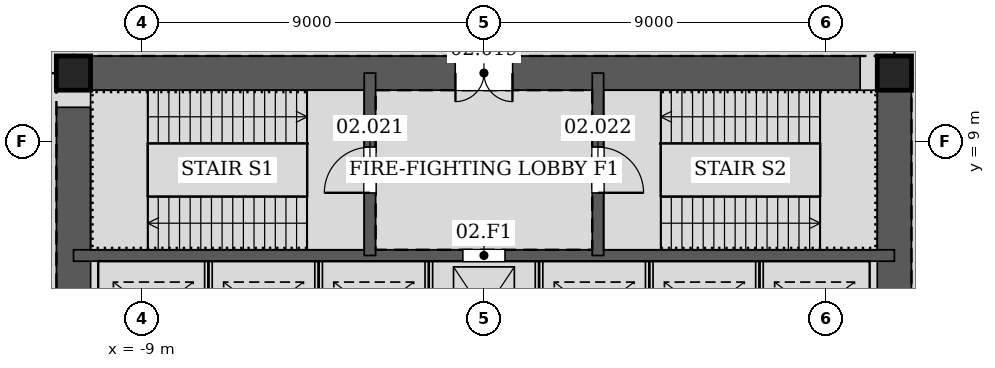
"""IFC4 building model, lengths in metres.
Left out: names, types, materials, properties, quantities, classifications, styles, units other than length and angle.
Written with IfcOpenShell. Run it as: python <this file> out.ifc"""

import sys

from ifc_helpers import new_model, si_unit, direction, frame, frame_2d, origin, origin_2d, place, context, subcontext, project, spatial, rectangle, hollow_rectangle, extrude, element, fill, save


model = new_model("IFC4")
c1 = context("Model", 3, precision=1e-05, world=origin(), true_north=direction((0.0, 1.0)))
c2 = subcontext(c1, "Body", "Model", "MODEL_VIEW")
j1 = project(units=[si_unit("LENGTHUNIT", "METRE"), si_unit("PLANEANGLEUNIT", "RADIAN")], contexts=[c1])
p1 = place(None, origin())
s1 = spatial("IfcSite", under=j1, at=p1, CompositionType="ELEMENT")
p2 = place(p1, origin())
s2 = spatial("IfcBuilding", under=s1, at=p2, CompositionType="ELEMENT")
p3 = place(p2, frame((0.0, 0.0, 13.2)))
s3 = spatial("IfcBuildingStorey", under=s2, at=p3, CompositionType="ELEMENT", Elevation=13.2)
for number, where, z_axis, x_axis in (
    (1, (10.8, 10.8, 0.0), (0.0, 0.0, 1.0), (1.0, 0.0, 0.0)),
    (2, (-10.8, 10.8, 0.0), (0.0, 0.0, 1.0), (1.0, 0.0, 0.0)),
):
    element("IfcColumn", number, at=place(p3, frame(where, z_axis=z_axis, x_axis=x_axis)), inside=s3, PredefinedType="COLUMN", context=c2, shape_type="SweptSolid", body=[
        extrude(hollow_rectangle(XDim=0.9, YDim=0.9, WallThickness=0.06, at=origin_2d()), origin(), (0.0, 0.0, 1.0), 5.4),
    ])
p4 = place(p3, frame((10.8, -10.8, 0.0), z_axis=(0.0, 0.0, 1.0), x_axis=(0.0, 1.0, 0.0)))
e3 = element("IfcWall", 3, at=p4, inside=s3, PredefinedType="SOLIDWALL", context=c2, shape_type="SweptSolid", body=[
    extrude(rectangle(XDim=21.6, YDim=0.9, at=frame_2d((10.8, 0.0))), origin(), (0.0, 0.0, 1.0), 5.4),
])
p5 = place(p4, frame((11.7, 0.0, 0.0)))
e4 = element("IfcOpeningElement", 4, at=p5, cuts=e3, PredefinedType="OPENING", context=c2, shape_type="SweptSolid", body=[
    extrude(rectangle(XDim=1.2, YDim=2.1, at=frame_2d((0.6, 1.05))), frame((0.0, 0.46, 0.0), z_axis=(0.0, -1.0, 0.0), x_axis=(1.0, 0.0, 0.0)), (0.0, 0.0, 1.0), 0.92),
])
p6 = place(p4, frame((8.7, 0.0, 0.0)))
e5 = element("IfcOpeningElement", 5, at=p6, cuts=e3, PredefinedType="OPENING", context=c2, shape_type="SweptSolid", body=[
    extrude(rectangle(XDim=1.2, YDim=2.1, at=frame_2d((0.6, 1.05))), frame((0.0, 0.46, 0.0), z_axis=(0.0, -1.0, 0.0), x_axis=(1.0, 0.0, 0.0)), (0.0, 0.0, 1.0), 0.92),
])
p7 = place(p3, frame((10.8, 10.8, 0.0), z_axis=(0.0, 0.0, 1.0), x_axis=(-1.0, 0.0, 0.0)))
e6 = element("IfcWall", 6, at=p7, inside=s3, PredefinedType="SOLIDWALL", context=c2, shape_type="SweptSolid", body=[
    extrude(rectangle(XDim=21.6, YDim=0.9, at=frame_2d((10.8, 0.0))), origin(), (0.0, 0.0, 1.0), 5.4),
])
p8 = place(p7, frame((10.05, 0.0, 0.0)))
e7 = element("IfcOpeningElement", 7, at=p8, cuts=e6, PredefinedType="OPENING", context=c2, shape_type="SweptSolid", body=[
    extrude(rectangle(XDim=1.5, YDim=2.1, at=frame_2d((0.75, 1.05))), frame((0.0, 0.46, 0.0), z_axis=(0.0, -1.0, 0.0), x_axis=(1.0, 0.0, 0.0)), (0.0, 0.0, 1.0), 0.92),
])
p9 = place(p3, frame((-10.8, 10.8, 0.0), z_axis=(0.0, 0.0, 1.0), x_axis=(0.0, -1.0, 0.0)))
e8 = element("IfcWall", 8, at=p9, inside=s3, PredefinedType="SOLIDWALL", context=c2, shape_type="SweptSolid", body=[
    extrude(rectangle(XDim=21.6, YDim=0.9, at=frame_2d((10.8, 0.0))), origin(), (0.0, 0.0, 1.0), 5.4),
])
p10 = place(p9, frame((8.7, 0.0, 0.0)))
e9 = element("IfcOpeningElement", 9, at=p10, cuts=e8, PredefinedType="OPENING", context=c2, shape_type="SweptSolid", body=[
    extrude(rectangle(XDim=1.2, YDim=2.1, at=frame_2d((0.6, 1.05))), frame((0.0, 0.46, 0.0), z_axis=(0.0, -1.0, 0.0), x_axis=(1.0, 0.0, 0.0)), (0.0, 0.0, 1.0), 0.92),
])
p11 = place(p9, frame((11.7, 0.0, 0.0)))
e10 = element("IfcOpeningElement", 10, at=p11, cuts=e8, PredefinedType="OPENING", context=c2, shape_type="SweptSolid", body=[
    extrude(rectangle(XDim=1.2, YDim=2.1, at=frame_2d((0.6, 1.05))), frame((0.0, 0.46, 0.0), z_axis=(0.0, -1.0, 0.0), x_axis=(1.0, 0.0, 0.0)), (0.0, 0.0, 1.0), 0.92),
])
p12 = place(p3, frame((-10.8, 6.0, 0.0), z_axis=(0.0, 0.0, 1.0), x_axis=(1.0, 0.0, 0.0)))
e11 = element("IfcWall", 11, at=p12, inside=s3, PredefinedType="SOLIDWALL", context=c2, shape_type="SweptSolid", body=[
    extrude(rectangle(XDim=21.6, YDim=0.3, at=frame_2d((10.8, 0.0))), origin(), (0.0, 0.0, 1.0), 5.4),
])
p13 = place(p12, frame((10.25, 0.0, 0.0)))
e12 = element("IfcOpeningElement", 12, at=p13, cuts=e11, PredefinedType="OPENING", context=c2, shape_type="SweptSolid", body=[
    extrude(rectangle(XDim=1.1, YDim=2.1, at=frame_2d((0.55, 1.05))), frame((0.0, 0.16, 0.0), z_axis=(0.0, -1.0, 0.0), x_axis=(1.0, 0.0, 0.0)), (0.0, 0.0, 1.0), 0.32),
])
p14 = place(p3, frame((-3.0, 6.0, 0.0), z_axis=(0.0, 0.0, 1.0), x_axis=(0.0, 1.0, 0.0)))
e13 = element("IfcWall", 13, at=p14, inside=s3, PredefinedType="SOLIDWALL", context=c2, shape_type="SweptSolid", body=[
    extrude(rectangle(XDim=4.8, YDim=0.3, at=frame_2d((2.4, 0.0))), origin(), (0.0, 0.0, 1.0), 5.4),
])
p15 = place(p14, frame((1.65, 0.0, 0.0)))
e14 = element("IfcOpeningElement", 14, at=p15, cuts=e13, PredefinedType="OPENING", context=c2, shape_type="SweptSolid", body=[
    extrude(rectangle(XDim=1.2, YDim=2.1, at=frame_2d((0.6, 1.05))), frame((0.0, 0.16, 0.0), z_axis=(0.0, -1.0, 0.0), x_axis=(1.0, 0.0, 0.0)), (0.0, 0.0, 1.0), 0.32),
])
p16 = place(p3, frame((3.0, 6.0, 0.0), z_axis=(0.0, 0.0, 1.0), x_axis=(0.0, 1.0, 0.0)))
e15 = element("IfcWall", 15, at=p16, inside=s3, PredefinedType="SOLIDWALL", context=c2, shape_type="SweptSolid", body=[
    extrude(rectangle(XDim=4.8, YDim=0.3, at=frame_2d((2.4, 0.0))), origin(), (0.0, 0.0, 1.0), 5.4),
])
p17 = place(p16, frame((1.65, 0.0, 0.0)))
e16 = element("IfcOpeningElement", 16, at=p17, cuts=e15, PredefinedType="OPENING", context=c2, shape_type="SweptSolid", body=[
    extrude(rectangle(XDim=1.2, YDim=2.1, at=frame_2d((0.6, 1.05))), frame((0.0, 0.16, 0.0), z_axis=(0.0, -1.0, 0.0), x_axis=(1.0, 0.0, 0.0)), (0.0, 0.0, 1.0), 0.32),
])
for number, where, z_axis, x_axis in (
    (17, (-7.25, 3.15, 0.0), (0.0, 0.0, 1.0), (0.0, 1.0, 0.0)),
    (18, (-4.35, 3.15, 0.0), (0.0, 0.0, 1.0), (0.0, 1.0, 0.0)),
    (19, (-1.45, 3.15, 0.0), (0.0, 0.0, 1.0), (0.0, 1.0, 0.0)),
    (20, (1.45, 3.15, 0.0), (0.0, 0.0, 1.0), (0.0, 1.0, 0.0)),
    (21, (4.35, 3.15, 0.0), (0.0, 0.0, 1.0), (0.0, 1.0, 0.0)),
    (22, (7.25, 3.15, 0.0), (0.0, 0.0, 1.0), (0.0, 1.0, 0.0)),
):
    element("IfcWall", number, at=place(p3, frame(where, z_axis=z_axis, x_axis=x_axis)), inside=s3, PredefinedType="PARTITIONING", context=c2, shape_type="SweptSolid", body=[
        extrude(rectangle(XDim=2.7, YDim=0.2, at=frame_2d((1.35, 0.0))), origin(), (0.0, 0.0, 1.0), 5.4),
    ])
p18 = place(p8, origin())
e23 = element("IfcDoor", 23, at=p18, inside=s3, OperationType="DOUBLE_DOOR_SINGLE_SWING", PredefinedType="DOOR", context=c2, shape_type="SweptSolid", body=[
    extrude(rectangle(XDim=1.5, YDim=2.1, at=frame_2d((0.75, 1.05))), frame((0.0, 0.025, 0.0), z_axis=(0.0, -1.0, 0.0), x_axis=(1.0, 0.0, 0.0)), (0.0, 0.0, 1.0), 0.05),
])
fill(e7, e23)
p19 = place(p15, origin())
e24 = element("IfcDoor", 24, at=p19, inside=s3, OperationType="SINGLE_SWING_LEFT", PredefinedType="DOOR", context=c2, shape_type="SweptSolid", body=[
    extrude(rectangle(XDim=1.2, YDim=2.1, at=frame_2d((0.6, 1.05))), frame((0.0, 0.025, 0.0), z_axis=(0.0, -1.0, 0.0), x_axis=(1.0, 0.0, 0.0)), (0.0, 0.0, 1.0), 0.05),
])
fill(e14, e24)
p20 = place(p17, frame((1.2, 0.0, 0.0), z_axis=(0.0, 0.0, 1.0), x_axis=(-1.0, 0.0, 0.0)))
e25 = element("IfcDoor", 25, at=p20, inside=s3, OperationType="SINGLE_SWING_RIGHT", PredefinedType="DOOR", context=c2, shape_type="SweptSolid", body=[
    extrude(rectangle(XDim=1.2, YDim=2.1, at=frame_2d((0.6, 1.05))), frame((0.0, 0.025, 0.0), z_axis=(0.0, -1.0, 0.0), x_axis=(1.0, 0.0, 0.0)), (0.0, 0.0, 1.0), 0.05),
])
fill(e16, e25)
p21 = place(p13, origin())
e26 = element("IfcDoor", 26, at=p21, inside=s3, OperationType="DOUBLE_DOOR_SLIDING", PredefinedType="DOOR", context=c2, shape_type="SweptSolid", body=[
    extrude(rectangle(XDim=1.1, YDim=2.1, at=frame_2d((0.55, 1.05))), frame((0.0, 0.025, 0.0), z_axis=(0.0, -1.0, 0.0), x_axis=(1.0, 0.0, 0.0)), (0.0, 0.0, 1.0), 0.05),
])
fill(e12, e26)
save(model, sys.argv[1])
